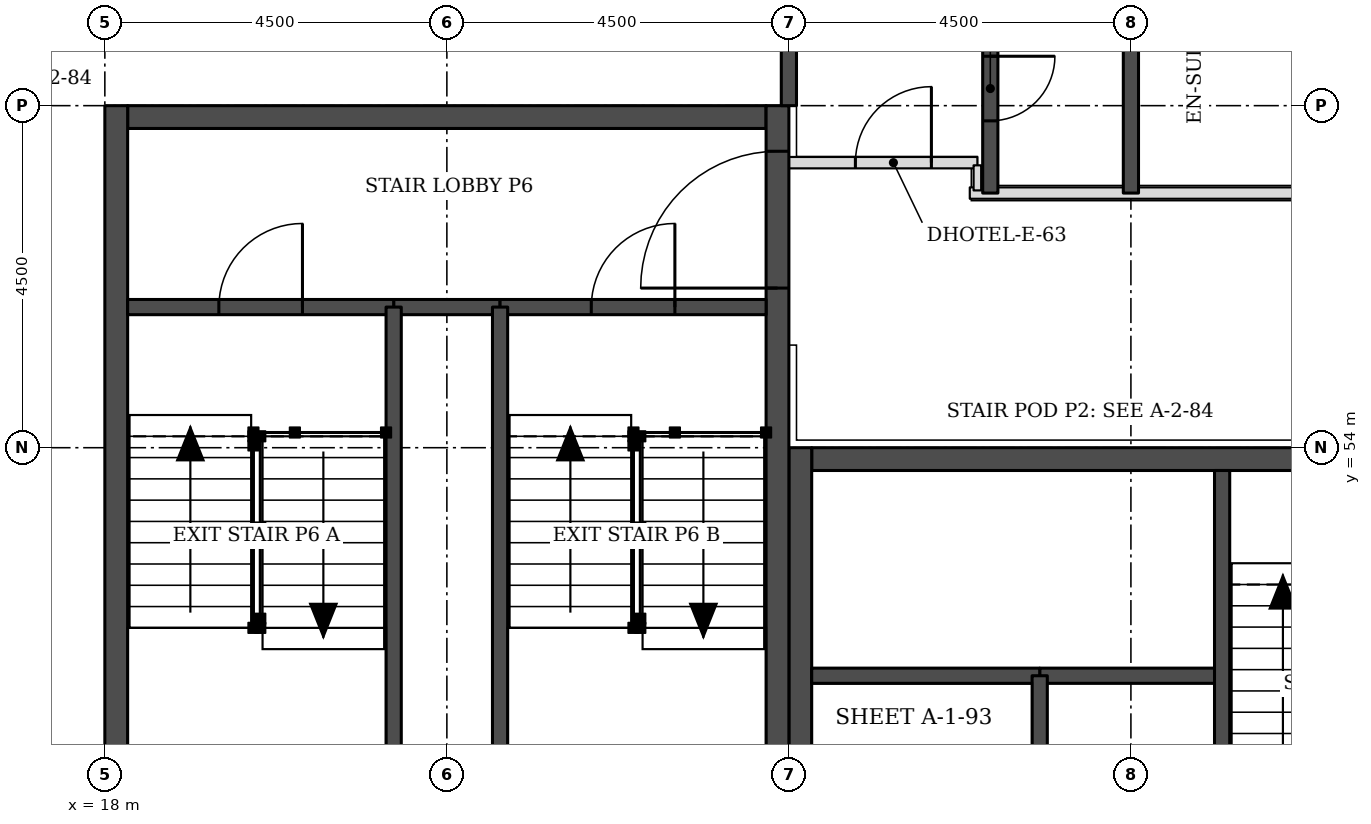
"""IFC4 building model, lengths in metres.
Left out: names, types, materials, properties, quantities, classifications, styles, units other than length and angle.
Written with IfcOpenShell. Run it as: python <this file> out.ifc"""

import sys

from ifc_helpers import new_model, si_unit, direction, frame, frame_2d, origin, place, context, subcontext, project, spatial, rectangle, extrude, element, fill, save


model = new_model("IFC4")
c1 = context("Model", 3, precision=1e-05, world=origin(), true_north=direction((0.0, 1.0)))
c2 = subcontext(c1, "Body", "Model", "MODEL_VIEW")
j1 = project(units=[si_unit("LENGTHUNIT", "METRE"), si_unit("PLANEANGLEUNIT", "RADIAN")], contexts=[c1])
p1 = place(None, origin())
s1 = spatial("IfcSite", under=j1, at=p1, CompositionType="ELEMENT")
p2 = place(p1, origin())
s2 = spatial("IfcBuilding", under=s1, at=p2, CompositionType="ELEMENT")
p3 = place(p2, frame((0.0, 0.0, 62.7)))
s3 = spatial("IfcBuildingStorey", under=s2, at=p3, CompositionType="ELEMENT", Elevation=62.7)
p4 = place(p3, frame((27.3, 53.85, 0.0), z_axis=(0.0, 0.0, 1.0), x_axis=(1.0, 0.0, 0.0)))
e1 = element("IfcWall", 1, at=p4, inside=s3, PredefinedType="SHEAR", context=c2, shape_type="SweptSolid", body=[
    extrude(rectangle(XDim=8.4, YDim=0.3, at=frame_2d((4.2, 0.0))), origin(), (0.0, 0.0, 1.0), 3.3),
])
p5 = place(p4, frame((6.4, 0.0, 0.0)))
e2 = element("IfcOpeningElement", 2, at=p5, cuts=e1, PredefinedType="OPENING", context=c2, shape_type="SweptSolid", body=[
    extrude(rectangle(XDim=1.1, YDim=2.1, at=frame_2d((0.55, 1.05))), frame((0.0, 0.16, 0.0), z_axis=(0.0, -1.0, 0.0), x_axis=(1.0, 0.0, 0.0)), (0.0, 0.0, 1.0), 0.32),
])
p6 = place(p3, frame((27.15, 45.0, 0.0), z_axis=(0.0, 0.0, 1.0), x_axis=(0.0, 1.0, 0.0)))
e3 = element("IfcWall", 3, at=p6, inside=s3, PredefinedType="SHEAR", context=c2, shape_type="SweptSolid", body=[
    extrude(rectangle(XDim=9.0, YDim=0.3, at=frame_2d((4.5, 0.0))), origin(), (0.0, 0.0, 1.0), 3.3),
])
p7 = place(p6, frame((0.4, 0.0, 0.0)))
e4 = element("IfcOpeningElement", 4, at=p7, cuts=e3, PredefinedType="OPENING", context=c2, shape_type="SweptSolid", body=[
    extrude(rectangle(XDim=1.1, YDim=2.1, at=frame_2d((0.55, 1.05))), frame((0.0, 0.16, 0.0), z_axis=(0.0, -1.0, 0.0), x_axis=(1.0, 0.0, 0.0)), (0.0, 0.0, 1.0), 0.32),
])
p8 = place(p3, frame((18.3, 58.35, 0.0), z_axis=(0.0, 0.0, 1.0), x_axis=(1.0, 0.0, 0.0)))
e5 = element("IfcWall", 5, at=p8, inside=s3, PredefinedType="SHEAR", context=c2, shape_type="SweptSolid", body=[
    extrude(rectangle(XDim=8.4, YDim=0.3, at=frame_2d((4.2, 0.0))), origin(), (0.0, 0.0, 1.0), 3.3),
])
p9 = place(p3, frame((18.15, 49.5, 0.0), z_axis=(0.0, 0.0, 1.0), x_axis=(0.0, 1.0, 0.0)))
e6 = element("IfcWall", 6, at=p9, inside=s3, PredefinedType="SHEAR", context=c2, shape_type="SweptSolid", body=[
    extrude(rectangle(XDim=9.0, YDim=0.3, at=frame_2d((4.5, 0.0))), origin(), (0.0, 0.0, 1.0), 3.3),
])
p10 = place(p3, frame((26.85, 49.5, 0.0), z_axis=(0.0, 0.0, 1.0), x_axis=(0.0, 1.0, 0.0)))
e7 = element("IfcWall", 7, at=p10, inside=s3, PredefinedType="SHEAR", context=c2, shape_type="SweptSolid", body=[
    extrude(rectangle(XDim=9.0, YDim=0.3, at=frame_2d((4.5, 0.0))), origin(), (0.0, 0.0, 1.0), 3.3),
])
p11 = place(p10, frame((6.6, 0.0, 0.0)))
e8 = element("IfcOpeningElement", 8, at=p11, cuts=e7, PredefinedType="OPENING", context=c2, shape_type="SweptSolid", body=[
    extrude(rectangle(XDim=1.8, YDim=2.1, at=frame_2d((0.9, 1.05))), frame((0.0, 0.16, 0.0), z_axis=(0.0, -1.0, 0.0), x_axis=(1.0, 0.0, 0.0)), (0.0, 0.0, 1.0), 0.32),
])
p12 = place(p3, frame((17.73, 63.826, 0.0), z_axis=(0.0, 0.0, 1.0), x_axis=(-0.707106781187, -0.707106781187, 0.0)))
e9 = element("IfcWall", 9, at=p12, inside=s3, PredefinedType="STANDARD", context=c2, shape_type="SweptSolid", body=[
    extrude(rectangle(XDim=7.151, YDim=0.35, at=frame_2d((3.576, 0.0))), origin(), (0.0, 0.0, 1.0), 3.055),
])
p13 = place(p12, frame((1.926, 0.0, 0.8)))
e10 = element("IfcOpeningElement", 10, at=p13, cuts=e9, PredefinedType="OPENING", context=c2, shape_type="SweptSolid", body=[
    extrude(rectangle(XDim=3.3, YDim=1.5, at=frame_2d((1.65, 0.75))), frame((0.0, 0.185, 0.0), z_axis=(0.0, -1.0, 0.0), x_axis=(1.0, 0.0, 0.0)), (0.0, 0.0, 1.0), 0.37),
])
p14 = place(p3, frame((29.38, 57.35, 0.0), z_axis=(0.0, 0.0, 1.0), x_axis=(1.0, 0.0, 0.0)))
e11 = element("IfcWall", 11, at=p14, inside=s3, PredefinedType="PARTITIONING", context=c2, shape_type="SweptSolid", body=[
    extrude(rectangle(XDim=13.62, YDim=0.15, at=frame_2d((6.81, 0.0))), origin(), (0.0, 0.0, 1.0), 3.08),
])
p15 = place(p14, frame((5.02, 0.0, 0.0)))
e12 = element("IfcOpeningElement", 12, at=p15, cuts=e11, PredefinedType="OPENING", context=c2, shape_type="SweptSolid", body=[
    extrude(rectangle(XDim=1.0, YDim=2.1, at=frame_2d((0.5, 1.05))), frame((0.0, 0.085, 0.0), z_axis=(0.0, -1.0, 0.0), x_axis=(1.0, 0.0, 0.0)), (0.0, 0.0, 1.0), 0.17),
])
p16 = place(p14, frame((9.67, 0.0, 0.0)))
e13 = element("IfcOpeningElement", 13, at=p16, cuts=e11, PredefinedType="OPENING", context=c2, shape_type="SweptSolid", body=[
    extrude(rectangle(XDim=0.9, YDim=2.1, at=frame_2d((0.45, 1.05))), frame((0.0, 0.085, 0.0), z_axis=(0.0, -1.0, 0.0), x_axis=(1.0, 0.0, 0.0)), (0.0, 0.0, 1.0), 0.17),
])
p17 = place(p3, frame((27.0, 58.5, 0.0), z_axis=(0.0, 0.0, 1.0), x_axis=(0.0, 1.0, 0.0)))
e14 = element("IfcWall", 14, at=p17, inside=s3, PredefinedType="SOLIDWALL", context=c2, shape_type="SweptSolid", body=[
    extrude(rectangle(XDim=3.9, YDim=0.2, at=frame_2d((1.95, 0.0))), origin(), (0.0, 0.0, 1.0), 3.08),
])
p18 = place(p3, frame((29.65, 57.35, 0.0), z_axis=(0.0, 0.0, 1.0), x_axis=(0.0, 1.0, 0.0)))
e15 = element("IfcWall", 15, at=p18, inside=s3, PredefinedType="SOLIDWALL", context=c2, shape_type="SweptSolid", body=[
    extrude(rectangle(XDim=2.75, YDim=0.2, at=frame_2d((1.375, 0.0))), origin(), (0.0, 0.0, 1.0), 3.08),
])
p19 = place(p18, frame((0.95, 0.0, 0.0)))
e16 = element("IfcOpeningElement", 16, at=p19, cuts=e15, PredefinedType="OPENING", context=c2, shape_type="SweptSolid", body=[
    extrude(rectangle(XDim=0.85, YDim=2.1, at=frame_2d((0.425, 1.05))), frame((0.0, 0.11, 0.0), z_axis=(0.0, -1.0, 0.0), x_axis=(1.0, 0.0, 0.0)), (0.0, 0.0, 1.0), 0.22),
])
p20 = place(p3, frame((31.5, 57.35, 0.0), z_axis=(0.0, 0.0, 1.0), x_axis=(0.0, 1.0, 0.0)))
e17 = element("IfcWall", 17, at=p20, inside=s3, PredefinedType="SOLIDWALL", context=c2, shape_type="SweptSolid", body=[
    extrude(rectangle(XDim=5.05, YDim=0.2, at=frame_2d((2.525, 0.0))), origin(), (0.0, 0.0, 1.0), 3.08),
])
p21 = place(p3, frame((27.0, 57.75, 0.0), z_axis=(0.0, 0.0, 1.0), x_axis=(1.0, 0.0, 0.0)))
e18 = element("IfcWall", 18, at=p21, inside=s3, PredefinedType="PARTITIONING", context=c2, shape_type="SweptSolid", body=[
    extrude(rectangle(XDim=2.48, YDim=0.15, at=frame_2d((1.24, 0.0))), origin(), (0.0, 0.0, 1.0), 3.08),
])
p22 = place(p21, frame((0.875, 0.0, 0.0)))
e19 = element("IfcOpeningElement", 19, at=p22, cuts=e18, PredefinedType="OPENING", context=c2, shape_type="SweptSolid", body=[
    extrude(rectangle(XDim=1.0, YDim=2.1, at=frame_2d((0.5, 1.05))), frame((0.0, 0.085, 0.0), z_axis=(0.0, -1.0, 0.0), x_axis=(1.0, 0.0, 0.0)), (0.0, 0.0, 1.0), 0.17),
])
p23 = place(p3, frame((29.48, 57.385, 0.0), z_axis=(0.0, 0.0, 1.0), x_axis=(0.0, 1.0, 0.0)))
e20 = element("IfcWall", 20, at=p23, inside=s3, PredefinedType="PARTITIONING", context=c2, shape_type="SweptSolid", body=[
    extrude(rectangle(XDim=0.33, YDim=0.1, at=frame_2d((0.165, 0.0))), origin(), (0.0, 0.0, 1.0), 3.08),
])
p24 = place(p3, frame((30.3, 51.0, 0.0), z_axis=(0.0, 0.0, 1.0), x_axis=(1.0, 0.0, 0.0)))
e21 = element("IfcWall", 21, at=p24, inside=s3, PredefinedType="SOLIDWALL", context=c2, shape_type="SweptSolid", body=[
    extrude(rectangle(XDim=2.4, YDim=0.2, at=frame_2d((1.2, 0.0))), origin(), (0.0, 0.0, 1.0), 3.3),
])
p25 = place(p3, frame((27.3, 51.0, 0.0), z_axis=(0.0, 0.0, 1.0), x_axis=(1.0, 0.0, 0.0)))
e22 = element("IfcWall", 22, at=p25, inside=s3, PredefinedType="SOLIDWALL", context=c2, shape_type="SweptSolid", body=[
    extrude(rectangle(XDim=3.0, YDim=0.2, at=frame_2d((1.5, 0.0))), origin(), (0.0, 0.0, 1.0), 3.08),
])
for number, where, z_axis, x_axis in (
    (23, (30.3, 45.3, 0.0), (0.0, 0.0, 1.0), (0.0, 1.0, 0.0)),
    (24, (32.7, 48.0, 0.0), (0.0, 0.0, 1.0), (0.0, 1.0, 0.0)),
):
    element("IfcWall", number, at=place(p3, frame(where, z_axis=z_axis, x_axis=x_axis)), inside=s3, PredefinedType="SOLIDWALL", context=c2, shape_type="SweptSolid", body=[
        extrude(rectangle(XDim=5.7, YDim=0.2, at=frame_2d((2.85, 0.0))), origin(), (0.0, 0.0, 1.0), 3.08),
    ])
p26 = place(p3, frame((21.8, 55.85, 0.0), z_axis=(0.0, 0.0, 1.0), x_axis=(1.0, 0.0, 0.0)))
e25 = element("IfcWall", 25, at=p26, inside=s3, PredefinedType="SOLIDWALL", context=c2, shape_type="SweptSolid", body=[
    extrude(rectangle(XDim=1.4, YDim=0.2, at=frame_2d((0.7, 0.0))), origin(), (0.0, 0.0, 1.0), 3.08),
])
p27 = place(p3, frame((18.3, 55.85, 0.0), z_axis=(0.0, 0.0, 1.0), x_axis=(1.0, 0.0, 0.0)))
e26 = element("IfcWall", 26, at=p27, inside=s3, PredefinedType="SOLIDWALL", context=c2, shape_type="SweptSolid", body=[
    extrude(rectangle(XDim=3.5, YDim=0.2, at=frame_2d((1.75, 0.0))), origin(), (0.0, 0.0, 1.0), 3.08),
])
p28 = place(p27, frame((1.2, 0.0, 0.0)))
e27 = element("IfcOpeningElement", 27, at=p28, cuts=e26, PredefinedType="OPENING", context=c2, shape_type="SweptSolid", body=[
    extrude(rectangle(XDim=1.1, YDim=2.1, at=frame_2d((0.55, 1.05))), frame((0.0, 0.11, 0.0), z_axis=(0.0, -1.0, 0.0), x_axis=(1.0, 0.0, 0.0)), (0.0, 0.0, 1.0), 0.22),
])
p29 = place(p3, frame((23.2, 55.85, 0.0), z_axis=(0.0, 0.0, 1.0), x_axis=(1.0, 0.0, 0.0)))
e28 = element("IfcWall", 28, at=p29, inside=s3, PredefinedType="SOLIDWALL", context=c2, shape_type="SweptSolid", body=[
    extrude(rectangle(XDim=3.5, YDim=0.2, at=frame_2d((1.75, 0.0))), origin(), (0.0, 0.0, 1.0), 3.08),
])
p30 = place(p29, frame((1.2, 0.0, 0.0)))
e29 = element("IfcOpeningElement", 29, at=p30, cuts=e28, PredefinedType="OPENING", context=c2, shape_type="SweptSolid", body=[
    extrude(rectangle(XDim=1.1, YDim=2.1, at=frame_2d((0.55, 1.05))), frame((0.0, 0.11, 0.0), z_axis=(0.0, -1.0, 0.0), x_axis=(1.0, 0.0, 0.0)), (0.0, 0.0, 1.0), 0.22),
])
for number, where, z_axis, x_axis in (
    (30, (21.8, 49.8, 0.0), (0.0, 0.0, 1.0), (0.0, 1.0, 0.0)),
    (31, (23.2, 49.8, 0.0), (0.0, 0.0, 1.0), (0.0, 1.0, 0.0)),
):
    element("IfcWall", number, at=place(p3, frame(where, z_axis=z_axis, x_axis=x_axis)), inside=s3, PredefinedType="SOLIDWALL", context=c2, shape_type="SweptSolid", body=[
        extrude(rectangle(XDim=6.05, YDim=0.2, at=frame_2d((3.025, 0.0))), origin(), (0.0, 0.0, 1.0), 3.08),
    ])
p31 = place(p19, frame((0.85, 0.0, 0.0), z_axis=(0.0, 0.0, 1.0), x_axis=(-1.0, 0.0, 0.0)))
e32 = element("IfcDoor", 32, at=p31, inside=s3, OperationType="SINGLE_SWING_LEFT", PredefinedType="DOOR", context=c2, shape_type="SweptSolid", body=[
    extrude(rectangle(XDim=0.85, YDim=2.1, at=frame_2d((0.425, 1.05))), frame((0.0, 0.025, 0.0), z_axis=(0.0, -1.0, 0.0), x_axis=(1.0, 0.0, 0.0)), (0.0, 0.0, 1.0), 0.05),
])
fill(e16, e32)
p32 = place(p22, origin())
e33 = element("IfcDoor", 33, at=p32, inside=s3, OperationType="SINGLE_SWING_RIGHT", PredefinedType="DOOR", context=c2, shape_type="SweptSolid", body=[
    extrude(rectangle(XDim=1.0, YDim=2.1, at=frame_2d((0.5, 1.05))), frame((0.0, 0.025, 0.0), z_axis=(0.0, -1.0, 0.0), x_axis=(1.0, 0.0, 0.0)), (0.0, 0.0, 1.0), 0.05),
])
fill(e19, e33)
p33 = place(p28, origin())
e34 = element("IfcDoor", 34, at=p33, inside=s3, OperationType="SINGLE_SWING_RIGHT", PredefinedType="DOOR", context=c2, shape_type="SweptSolid", body=[
    extrude(rectangle(XDim=1.1, YDim=2.1, at=frame_2d((0.55, 1.05))), frame((0.0, 0.025, 0.0), z_axis=(0.0, -1.0, 0.0), x_axis=(1.0, 0.0, 0.0)), (0.0, 0.0, 1.0), 0.05),
])
fill(e27, e34)
p34 = place(p30, origin())
e35 = element("IfcDoor", 35, at=p34, inside=s3, OperationType="SINGLE_SWING_RIGHT", PredefinedType="DOOR", context=c2, shape_type="SweptSolid", body=[
    extrude(rectangle(XDim=1.1, YDim=2.1, at=frame_2d((0.55, 1.05))), frame((0.0, 0.025, 0.0), z_axis=(0.0, -1.0, 0.0), x_axis=(1.0, 0.0, 0.0)), (0.0, 0.0, 1.0), 0.05),
])
fill(e29, e35)
p35 = place(p11, origin())
e36 = element("IfcDoor", 36, at=p35, inside=s3, OperationType="SINGLE_SWING_LEFT", PredefinedType="DOOR", context=c2, shape_type="SweptSolid", body=[
    extrude(rectangle(XDim=1.8, YDim=2.1, at=frame_2d((0.9, 1.05))), frame((0.0, 0.025, 0.0), z_axis=(0.0, -1.0, 0.0), x_axis=(1.0, 0.0, 0.0)), (0.0, 0.0, 1.0), 0.05),
])
fill(e8, e36)
save(model, sys.argv[1])
